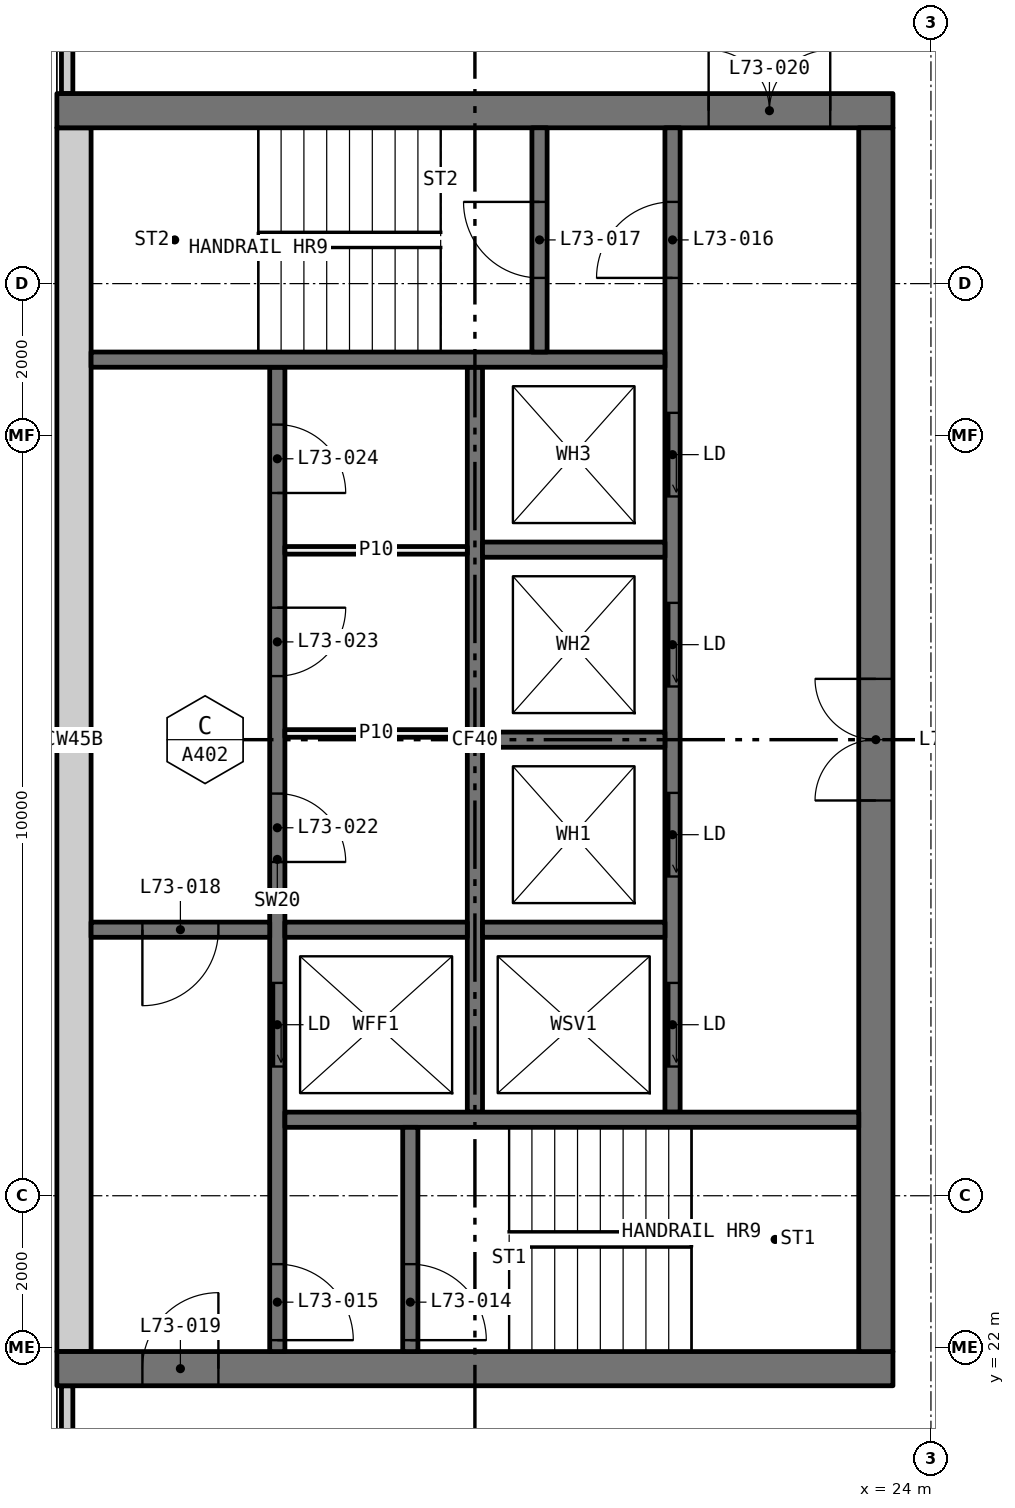
"""IFC4 building model, lengths in metres.
Left out: names, types, materials, properties, quantities, classifications, styles, units other than length and angle.
Written with IfcOpenShell. Run it as: python <this file> out.ifc"""

import sys

from ifc_helpers import new_model, si_unit, direction, frame, frame_2d, origin, place, context, subcontext, project, spatial, rectangle, extrude, element, fill, save


model = new_model("IFC4")
c1 = context("Model", 3, precision=1e-05, world=origin(), true_north=direction((0.0, 1.0)))
c2 = subcontext(c1, "Body", "Model", "MODEL_VIEW")
j1 = project(units=[si_unit("LENGTHUNIT", "METRE"), si_unit("PLANEANGLEUNIT", "RADIAN")], contexts=[c1])
p1 = place(None, origin())
s1 = spatial("IfcSite", under=j1, at=p1, CompositionType="ELEMENT")
p2 = place(p1, origin())
s2 = spatial("IfcBuilding", under=s1, at=p2, CompositionType="ELEMENT")
p3 = place(p2, frame((0.0, 0.0, 269.7)))
s3 = spatial("IfcBuildingStorey", under=s2, at=p3, CompositionType="ELEMENT", Elevation=269.7)
for number, where, z_axis, x_axis in (
    (1, (12.635, 18.71, 0.0), (0.0, 0.0, 1.0), (0.0, 1.0, 0.0)),
    (2, (12.635, 38.5, 0.0), (0.0, 0.0, 1.0), (0.0, 1.0, 0.0)),
):
    element("IfcWall", number, at=place(p3, frame(where, z_axis=z_axis, x_axis=x_axis)), inside=s3, PredefinedType="ELEMENTEDWALL", context=c2, shape_type="SweptSolid", body=[
        extrude(rectangle(XDim=2.79, YDim=0.15, at=frame_2d((1.395, 0.0))), origin(), (0.0, 0.0, 1.0), 3.05),
    ])
p4 = place(p3, frame((12.5, 21.725, 0.0), z_axis=(0.0, 0.0, 1.0), x_axis=(1.0, 0.0, 0.0)))
e3 = element("IfcWall", 3, at=p4, inside=s3, PredefinedType="SHEAR", context=c2, shape_type="SweptSolid", body=[
    extrude(rectangle(XDim=11.0, YDim=0.45, at=frame_2d((5.5, 0.0))), origin(), (0.0, 0.0, 1.0), 3.05),
])
p5 = place(p4, frame((1.125, 0.0, 0.0)))
e4 = element("IfcOpeningElement", 4, at=p5, cuts=e3, PredefinedType="OPENING", context=c2, shape_type="SweptSolid", body=[
    extrude(rectangle(XDim=1.0, YDim=2.1, at=frame_2d((0.5, 1.05))), frame((0.0, 0.235, 0.0), z_axis=(0.0, -1.0, 0.0), x_axis=(1.0, 0.0, 0.0)), (0.0, 0.0, 1.0), 0.47),
])
p6 = place(p3, frame((12.5, 38.275, 0.0), z_axis=(0.0, 0.0, 1.0), x_axis=(1.0, 0.0, 0.0)))
e5 = element("IfcWall", 5, at=p6, inside=s3, PredefinedType="SHEAR", context=c2, shape_type="SweptSolid", body=[
    extrude(rectangle(XDim=11.0, YDim=0.45, at=frame_2d((5.5, 0.0))), origin(), (0.0, 0.0, 1.0), 3.05),
])
p7 = place(p6, frame((8.575, 0.0, 0.0)))
e6 = element("IfcOpeningElement", 6, at=p7, cuts=e5, PredefinedType="OPENING", context=c2, shape_type="SweptSolid", body=[
    extrude(rectangle(XDim=1.6, YDim=2.1, at=frame_2d((0.8, 1.05))), frame((0.0, 0.235, 0.0), z_axis=(0.0, -1.0, 0.0), x_axis=(1.0, 0.0, 0.0)), (0.0, 0.0, 1.0), 0.47),
])
p8 = place(p3, frame((12.725, 21.95, 0.0), z_axis=(0.0, 0.0, 1.0), x_axis=(0.0, 1.0, 0.0)))
e7 = element("IfcWall", 7, at=p8, inside=s3, PredefinedType="SHEAR", context=c2, shape_type="SweptSolid", body=[
    extrude(rectangle(XDim=16.1, YDim=0.45, at=frame_2d((8.05, 0.0))), origin(), (0.0, 0.0, 1.0), 3.05),
])
p9 = place(p3, frame((23.275, 21.95, 0.0), z_axis=(0.0, 0.0, 1.0), x_axis=(0.0, 1.0, 0.0)))
e8 = element("IfcWall", 8, at=p9, inside=s3, PredefinedType="SHEAR", context=c2, shape_type="SweptSolid", body=[
    extrude(rectangle(XDim=16.1, YDim=0.45, at=frame_2d((8.05, 0.0))), origin(), (0.0, 0.0, 1.0), 3.05),
])
p10 = place(p9, frame((7.25, 0.0, 0.0)))
e9 = element("IfcOpeningElement", 9, at=p10, cuts=e8, PredefinedType="OPENING", context=c2, shape_type="SweptSolid", body=[
    extrude(rectangle(XDim=1.6, YDim=2.1, at=frame_2d((0.8, 1.05))), frame((0.0, 0.235, 0.0), z_axis=(0.0, -1.0, 0.0), x_axis=(1.0, 0.0, 0.0)), (0.0, 0.0, 1.0), 0.47),
])
p11 = place(p3, frame((15.4, 21.95, 0.0), z_axis=(0.0, 0.0, 1.0), x_axis=(0.0, 1.0, 0.0)))
e10 = element("IfcWall", 10, at=p11, inside=s3, PredefinedType="SOLIDWALL", context=c2, shape_type="SweptSolid", body=[
    extrude(rectangle(XDim=12.95, YDim=0.2, at=frame_2d((6.475, 0.0))), origin(), (0.0, 0.0, 1.0), 3.05),
])
p12 = place(p11, frame((3.75, 0.0, 0.0)))
e11 = element("IfcOpeningElement", 11, at=p12, cuts=e10, PredefinedType="OPENING", context=c2, shape_type="SweptSolid", body=[
    extrude(rectangle(XDim=1.1, YDim=2.1, at=frame_2d((0.55, 1.05))), frame((0.0, 0.11, 0.0), z_axis=(0.0, -1.0, 0.0), x_axis=(1.0, 0.0, 0.0)), (0.0, 0.0, 1.0), 0.22),
])
p13 = place(p11, frame((0.15, 0.0, 0.0)))
e12 = element("IfcOpeningElement", 12, at=p13, cuts=e10, PredefinedType="OPENING", context=c2, shape_type="SweptSolid", body=[
    extrude(rectangle(XDim=1.0, YDim=2.1, at=frame_2d((0.5, 1.05))), frame((0.0, 0.11, 0.0), z_axis=(0.0, -1.0, 0.0), x_axis=(1.0, 0.0, 0.0)), (0.0, 0.0, 1.0), 0.22),
])
p14 = place(p11, frame((6.441, 0.0, 0.0)))
e13 = element("IfcOpeningElement", 13, at=p14, cuts=e10, PredefinedType="OPENING", context=c2, shape_type="SweptSolid", body=[
    extrude(rectangle(XDim=0.9, YDim=2.1, at=frame_2d((0.45, 1.05))), frame((0.0, 0.11, 0.0), z_axis=(0.0, -1.0, 0.0), x_axis=(1.0, 0.0, 0.0)), (0.0, 0.0, 1.0), 0.22),
])
p15 = place(p11, frame((8.886, 0.0, 0.0)))
e14 = element("IfcOpeningElement", 14, at=p15, cuts=e10, PredefinedType="OPENING", context=c2, shape_type="SweptSolid", body=[
    extrude(rectangle(XDim=0.9, YDim=2.1, at=frame_2d((0.45, 1.05))), frame((0.0, 0.11, 0.0), z_axis=(0.0, -1.0, 0.0), x_axis=(1.0, 0.0, 0.0)), (0.0, 0.0, 1.0), 0.22),
])
p16 = place(p11, frame((11.295, 0.0, 0.0)))
e15 = element("IfcOpeningElement", 15, at=p16, cuts=e10, PredefinedType="OPENING", context=c2, shape_type="SweptSolid", body=[
    extrude(rectangle(XDim=0.9, YDim=2.1, at=frame_2d((0.45, 1.05))), frame((0.0, 0.11, 0.0), z_axis=(0.0, -1.0, 0.0), x_axis=(1.0, 0.0, 0.0)), (0.0, 0.0, 1.0), 0.22),
])
p17 = place(p3, frame((20.6, 25.1, 0.0), z_axis=(0.0, 0.0, 1.0), x_axis=(0.0, 1.0, 0.0)))
e16 = element("IfcWall", 16, at=p17, inside=s3, PredefinedType="SOLIDWALL", context=c2, shape_type="SweptSolid", body=[
    extrude(rectangle(XDim=12.95, YDim=0.2, at=frame_2d((6.475, 0.0))), origin(), (0.0, 0.0, 1.0), 3.05),
])
p18 = place(p17, frame((0.6, 0.0, 0.0)))
e17 = element("IfcOpeningElement", 17, at=p18, cuts=e16, PredefinedType="OPENING", context=c2, shape_type="SweptSolid", body=[
    extrude(rectangle(XDim=1.1, YDim=2.1, at=frame_2d((0.55, 1.05))), frame((0.0, 0.11, 0.0), z_axis=(0.0, -1.0, 0.0), x_axis=(1.0, 0.0, 0.0)), (0.0, 0.0, 1.0), 0.22),
])
p19 = place(p17, frame((3.1, 0.0, 0.0)))
e18 = element("IfcOpeningElement", 18, at=p19, cuts=e16, PredefinedType="OPENING", context=c2, shape_type="SweptSolid", body=[
    extrude(rectangle(XDim=1.1, YDim=2.1, at=frame_2d((0.55, 1.05))), frame((0.0, 0.11, 0.0), z_axis=(0.0, -1.0, 0.0), x_axis=(1.0, 0.0, 0.0)), (0.0, 0.0, 1.0), 0.22),
])
p20 = place(p17, frame((5.6, 0.0, 0.0)))
e19 = element("IfcOpeningElement", 19, at=p20, cuts=e16, PredefinedType="OPENING", context=c2, shape_type="SweptSolid", body=[
    extrude(rectangle(XDim=1.1, YDim=2.1, at=frame_2d((0.55, 1.05))), frame((0.0, 0.11, 0.0), z_axis=(0.0, -1.0, 0.0), x_axis=(1.0, 0.0, 0.0)), (0.0, 0.0, 1.0), 0.22),
])
p21 = place(p17, frame((8.1, 0.0, 0.0)))
e20 = element("IfcOpeningElement", 20, at=p21, cuts=e16, PredefinedType="OPENING", context=c2, shape_type="SweptSolid", body=[
    extrude(rectangle(XDim=1.1, YDim=2.1, at=frame_2d((0.55, 1.05))), frame((0.0, 0.11, 0.0), z_axis=(0.0, -1.0, 0.0), x_axis=(1.0, 0.0, 0.0)), (0.0, 0.0, 1.0), 0.22),
])
p22 = place(p17, frame((10.975, 0.0, 0.0)))
e21 = element("IfcOpeningElement", 21, at=p22, cuts=e16, PredefinedType="OPENING", context=c2, shape_type="SweptSolid", body=[
    extrude(rectangle(XDim=1.0, YDim=2.1, at=frame_2d((0.5, 1.05))), frame((0.0, 0.11, 0.0), z_axis=(0.0, -1.0, 0.0), x_axis=(1.0, 0.0, 0.0)), (0.0, 0.0, 1.0), 0.22),
])
p23 = place(p3, frame((18.0, 25.1, 0.0), z_axis=(0.0, 0.0, 1.0), x_axis=(0.0, 1.0, 0.0)))
e22 = element("IfcWall", 22, at=p23, inside=s3, PredefinedType="SOLIDWALL", context=c2, shape_type="SweptSolid", body=[
    extrude(rectangle(XDim=9.8, YDim=0.2, at=frame_2d((4.9, 0.0))), origin(), (0.0, 0.0, 1.0), 3.05),
])
for number, where, z_axis, x_axis in (
    (23, (15.5, 25.0, 0.0), (0.0, 0.0, 1.0), (1.0, 0.0, 0.0)),
    (24, (12.95, 35.0, 0.0), (0.0, 0.0, 1.0), (1.0, 0.0, 0.0)),
):
    element("IfcWall", number, at=place(p3, frame(where, z_axis=z_axis, x_axis=x_axis)), inside=s3, PredefinedType="SOLIDWALL", context=c2, shape_type="SweptSolid", body=[
        extrude(rectangle(XDim=7.55, YDim=0.2, at=frame_2d((3.775, 0.0))), origin(), (0.0, 0.0, 1.0), 3.05),
    ])
p24 = place(p3, frame((12.95, 27.5, 0.0), z_axis=(0.0, 0.0, 1.0), x_axis=(1.0, 0.0, 0.0)))
e25 = element("IfcWall", 25, at=p24, inside=s3, PredefinedType="SOLIDWALL", context=c2, shape_type="SweptSolid", body=[
    extrude(rectangle(XDim=2.35, YDim=0.2, at=frame_2d((1.175, 0.0))), origin(), (0.0, 0.0, 1.0), 3.05),
])
p25 = place(p24, frame((0.675, 0.0, 0.0)))
e26 = element("IfcOpeningElement", 26, at=p25, cuts=e25, PredefinedType="OPENING", context=c2, shape_type="SweptSolid", body=[
    extrude(rectangle(XDim=1.0, YDim=2.1, at=frame_2d((0.5, 1.05))), frame((0.0, 0.11, 0.0), z_axis=(0.0, -1.0, 0.0), x_axis=(1.0, 0.0, 0.0)), (0.0, 0.0, 1.0), 0.22),
])
p26 = place(p3, frame((17.15, 21.95, 0.0), z_axis=(0.0, 0.0, 1.0), x_axis=(0.0, 1.0, 0.0)))
e27 = element("IfcWall", 27, at=p26, inside=s3, PredefinedType="SOLIDWALL", context=c2, shape_type="SweptSolid", body=[
    extrude(rectangle(XDim=2.95, YDim=0.2, at=frame_2d((1.475, 0.0))), origin(), (0.0, 0.0, 1.0), 3.05),
])
p27 = place(p26, frame((0.15, 0.0, 0.0)))
e28 = element("IfcOpeningElement", 28, at=p27, cuts=e27, PredefinedType="OPENING", context=c2, shape_type="SweptSolid", body=[
    extrude(rectangle(XDim=1.0, YDim=2.1, at=frame_2d((0.5, 1.05))), frame((0.0, 0.11, 0.0), z_axis=(0.0, -1.0, 0.0), x_axis=(1.0, 0.0, 0.0)), (0.0, 0.0, 1.0), 0.22),
])
p28 = place(p3, frame((18.85, 35.1, 0.0), z_axis=(0.0, 0.0, 1.0), x_axis=(0.0, 1.0, 0.0)))
e29 = element("IfcWall", 29, at=p28, inside=s3, PredefinedType="SOLIDWALL", context=c2, shape_type="SweptSolid", body=[
    extrude(rectangle(XDim=2.95, YDim=0.2, at=frame_2d((1.475, 0.0))), origin(), (0.0, 0.0, 1.0), 3.05),
])
p29 = place(p28, frame((0.975, 0.0, 0.0)))
e30 = element("IfcOpeningElement", 30, at=p29, cuts=e29, PredefinedType="OPENING", context=c2, shape_type="SweptSolid", body=[
    extrude(rectangle(XDim=1.0, YDim=2.1, at=frame_2d((0.5, 1.05))), frame((0.0, 0.11, 0.0), z_axis=(0.0, -1.0, 0.0), x_axis=(1.0, 0.0, 0.0)), (0.0, 0.0, 1.0), 0.22),
])
for number, where, z_axis, x_axis in (
    (31, (15.5, 27.5, 0.0), (0.0, 0.0, 1.0), (1.0, 0.0, 0.0)),
    (32, (18.1, 27.5, 0.0), (0.0, 0.0, 1.0), (1.0, 0.0, 0.0)),
    (33, (18.1, 30.0, 0.0), (0.0, 0.0, 1.0), (1.0, 0.0, 0.0)),
    (34, (18.1, 32.5, 0.0), (0.0, 0.0, 1.0), (1.0, 0.0, 0.0)),
):
    element("IfcWall", number, at=place(p3, frame(where, z_axis=z_axis, x_axis=x_axis)), inside=s3, PredefinedType="SOLIDWALL", context=c2, shape_type="SweptSolid", body=[
        extrude(rectangle(XDim=2.4, YDim=0.2, at=frame_2d((1.2, 0.0))), origin(), (0.0, 0.0, 1.0), 3.05),
    ])
for number, where, z_axis, x_axis in (
    (35, (15.5, 30.082, 0.0), (0.0, 0.0, 1.0), (1.0, 0.0, 0.0)),
    (36, (15.5, 32.491, 0.0), (0.0, 0.0, 1.0), (1.0, 0.0, 0.0)),
):
    element("IfcWall", number, at=place(p3, frame(where, z_axis=z_axis, x_axis=x_axis)), inside=s3, PredefinedType="PARTITIONING", context=c2, shape_type="SweptSolid", body=[
        extrude(rectangle(XDim=2.4, YDim=0.1, at=frame_2d((1.2, 0.0))), origin(), (0.0, 0.0, 1.0), 3.05),
    ])
p30 = place(p18, origin())
e37 = element("IfcDoor", 37, at=p30, inside=s3, OperationType="SLIDING_TO_LEFT", PredefinedType="DOOR", context=c2, shape_type="SweptSolid", body=[
    extrude(rectangle(XDim=1.1, YDim=2.1, at=frame_2d((0.55, 1.05))), frame((0.0, 0.025, 0.0), z_axis=(0.0, -1.0, 0.0), x_axis=(1.0, 0.0, 0.0)), (0.0, 0.0, 1.0), 0.05),
])
fill(e17, e37)
p31 = place(p19, origin())
e38 = element("IfcDoor", 38, at=p31, inside=s3, OperationType="SLIDING_TO_LEFT", PredefinedType="DOOR", context=c2, shape_type="SweptSolid", body=[
    extrude(rectangle(XDim=1.1, YDim=2.1, at=frame_2d((0.55, 1.05))), frame((0.0, 0.025, 0.0), z_axis=(0.0, -1.0, 0.0), x_axis=(1.0, 0.0, 0.0)), (0.0, 0.0, 1.0), 0.05),
])
fill(e18, e38)
p32 = place(p20, origin())
e39 = element("IfcDoor", 39, at=p32, inside=s3, OperationType="SLIDING_TO_LEFT", PredefinedType="DOOR", context=c2, shape_type="SweptSolid", body=[
    extrude(rectangle(XDim=1.1, YDim=2.1, at=frame_2d((0.55, 1.05))), frame((0.0, 0.025, 0.0), z_axis=(0.0, -1.0, 0.0), x_axis=(1.0, 0.0, 0.0)), (0.0, 0.0, 1.0), 0.05),
])
fill(e19, e39)
p33 = place(p21, origin())
e40 = element("IfcDoor", 40, at=p33, inside=s3, OperationType="SLIDING_TO_LEFT", PredefinedType="DOOR", context=c2, shape_type="SweptSolid", body=[
    extrude(rectangle(XDim=1.1, YDim=2.1, at=frame_2d((0.55, 1.05))), frame((0.0, 0.025, 0.0), z_axis=(0.0, -1.0, 0.0), x_axis=(1.0, 0.0, 0.0)), (0.0, 0.0, 1.0), 0.05),
])
fill(e20, e40)
p34 = place(p12, origin())
e41 = element("IfcDoor", 41, at=p34, inside=s3, OperationType="SLIDING_TO_LEFT", PredefinedType="DOOR", context=c2, shape_type="SweptSolid", body=[
    extrude(rectangle(XDim=1.1, YDim=2.1, at=frame_2d((0.55, 1.05))), frame((0.0, 0.025, 0.0), z_axis=(0.0, -1.0, 0.0), x_axis=(1.0, 0.0, 0.0)), (0.0, 0.0, 1.0), 0.05),
])
fill(e11, e41)
p35 = place(p27, frame((1.0, 0.0, 0.0), x_axis=(-1.0, 0.0, 0.0)))
e42 = element("IfcDoor", 42, at=p35, inside=s3, OperationType="SINGLE_SWING_LEFT", PredefinedType="DOOR", context=c2, shape_type="SweptSolid", body=[
    extrude(rectangle(XDim=1.0, YDim=2.1, at=frame_2d((0.5, 1.05))), frame((0.0, 0.025, 0.0), z_axis=(0.0, -1.0, 0.0), x_axis=(1.0, 0.0, 0.0)), (0.0, 0.0, 1.0), 0.05),
])
fill(e28, e42)
p36 = place(p13, frame((1.0, 0.0, 0.0), x_axis=(-1.0, 0.0, 0.0)))
e43 = element("IfcDoor", 43, at=p36, inside=s3, OperationType="SINGLE_SWING_LEFT", PredefinedType="DOOR", context=c2, shape_type="SweptSolid", body=[
    extrude(rectangle(XDim=1.0, YDim=2.1, at=frame_2d((0.5, 1.05))), frame((0.0, 0.025, 0.0), z_axis=(0.0, -1.0, 0.0), x_axis=(1.0, 0.0, 0.0)), (0.0, 0.0, 1.0), 0.05),
])
fill(e12, e43)
p37 = place(p22, origin())
e44 = element("IfcDoor", 44, at=p37, inside=s3, OperationType="SINGLE_SWING_RIGHT", PredefinedType="DOOR", context=c2, shape_type="SweptSolid", body=[
    extrude(rectangle(XDim=1.0, YDim=2.1, at=frame_2d((0.5, 1.05))), frame((0.0, 0.025, 0.0), z_axis=(0.0, -1.0, 0.0), x_axis=(1.0, 0.0, 0.0)), (0.0, 0.0, 1.0), 0.05),
])
fill(e21, e44)
p38 = place(p29, origin())
e45 = element("IfcDoor", 45, at=p38, inside=s3, OperationType="SINGLE_SWING_LEFT", PredefinedType="DOOR", context=c2, shape_type="SweptSolid", body=[
    extrude(rectangle(XDim=1.0, YDim=2.1, at=frame_2d((0.5, 1.05))), frame((0.0, 0.025, 0.0), z_axis=(0.0, -1.0, 0.0), x_axis=(1.0, 0.0, 0.0)), (0.0, 0.0, 1.0), 0.05),
])
fill(e30, e45)
p39 = place(p25, frame((1.0, 0.0, 0.0), x_axis=(-1.0, 0.0, 0.0)))
e46 = element("IfcDoor", 46, at=p39, inside=s3, OperationType="SINGLE_SWING_LEFT", PredefinedType="DOOR", context=c2, shape_type="SweptSolid", body=[
    extrude(rectangle(XDim=1.0, YDim=2.1, at=frame_2d((0.5, 1.05))), frame((0.0, 0.025, 0.0), z_axis=(0.0, -1.0, 0.0), x_axis=(1.0, 0.0, 0.0)), (0.0, 0.0, 1.0), 0.05),
])
fill(e26, e46)
p40 = place(p5, origin())
e47 = element("IfcDoor", 47, at=p40, inside=s3, OperationType="SINGLE_SWING_LEFT", PredefinedType="DOOR", context=c2, shape_type="SweptSolid", body=[
    extrude(rectangle(XDim=1.0, YDim=2.1, at=frame_2d((0.5, 1.05))), frame((0.0, 0.025, 0.0), z_axis=(0.0, -1.0, 0.0), x_axis=(1.0, 0.0, 0.0)), (0.0, 0.0, 1.0), 0.05),
])
fill(e4, e47)
p41 = place(p7, origin())
e48 = element("IfcDoor", 48, at=p41, inside=s3, OperationType="DOUBLE_DOOR_SINGLE_SWING", PredefinedType="DOOR", context=c2, shape_type="SweptSolid", body=[
    extrude(rectangle(XDim=1.6, YDim=2.1, at=frame_2d((0.8, 1.05))), frame((0.0, 0.025, 0.0), z_axis=(0.0, -1.0, 0.0), x_axis=(1.0, 0.0, 0.0)), (0.0, 0.0, 1.0), 0.05),
])
fill(e6, e48)
p42 = place(p10, origin())
e49 = element("IfcDoor", 49, at=p42, inside=s3, OperationType="DOUBLE_DOOR_SINGLE_SWING", PredefinedType="DOOR", context=c2, shape_type="SweptSolid", body=[
    extrude(rectangle(XDim=1.6, YDim=2.1, at=frame_2d((0.8, 1.05))), frame((0.0, 0.025, 0.0), z_axis=(0.0, -1.0, 0.0), x_axis=(1.0, 0.0, 0.0)), (0.0, 0.0, 1.0), 0.05),
])
fill(e9, e49)
p43 = place(p14, frame((0.9, 0.0, 0.0), x_axis=(-1.0, 0.0, 0.0)))
e50 = element("IfcDoor", 50, at=p43, inside=s3, OperationType="SINGLE_SWING_LEFT", PredefinedType="DOOR", context=c2, shape_type="SweptSolid", body=[
    extrude(rectangle(XDim=0.9, YDim=2.1, at=frame_2d((0.45, 1.05))), frame((0.0, 0.025, 0.0), z_axis=(0.0, -1.0, 0.0), x_axis=(1.0, 0.0, 0.0)), (0.0, 0.0, 1.0), 0.05),
])
fill(e13, e50)
p44 = place(p15, frame((0.9, 0.0, 0.0), x_axis=(-1.0, 0.0, 0.0)))
e51 = element("IfcDoor", 51, at=p44, inside=s3, OperationType="SINGLE_SWING_RIGHT", PredefinedType="DOOR", context=c2, shape_type="SweptSolid", body=[
    extrude(rectangle(XDim=0.9, YDim=2.1, at=frame_2d((0.45, 1.05))), frame((0.0, 0.025, 0.0), z_axis=(0.0, -1.0, 0.0), x_axis=(1.0, 0.0, 0.0)), (0.0, 0.0, 1.0), 0.05),
])
fill(e14, e51)
p45 = place(p16, frame((0.9, 0.0, 0.0), x_axis=(-1.0, 0.0, 0.0)))
e52 = element("IfcDoor", 52, at=p45, inside=s3, OperationType="SINGLE_SWING_LEFT", PredefinedType="DOOR", context=c2, shape_type="SweptSolid", body=[
    extrude(rectangle(XDim=0.9, YDim=2.1, at=frame_2d((0.45, 1.05))), frame((0.0, 0.025, 0.0), z_axis=(0.0, -1.0, 0.0), x_axis=(1.0, 0.0, 0.0)), (0.0, 0.0, 1.0), 0.05),
])
fill(e15, e52)
save(model, sys.argv[1])
